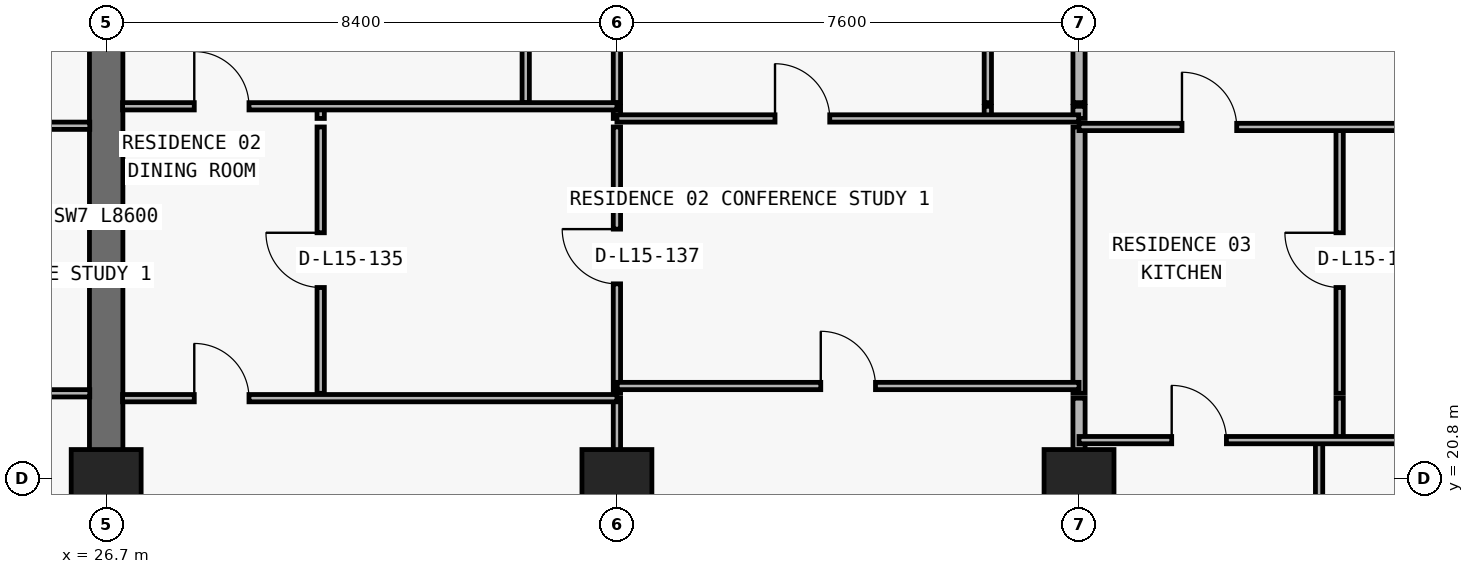
"""IFC4 building model, lengths in metres.
Left out: names, types, materials, properties, quantities, classifications, styles, units other than length and angle.
Written with IfcOpenShell. Run it as: python <this file> out.ifc"""

import sys

from ifc_helpers import new_model, si_unit, direction, frame, frame_2d, origin, origin_2d, place, context, subcontext, project, spatial, rectangle, extrude, element, fill, save


model = new_model("IFC4")
c1 = context("Model", 3, precision=1e-05, world=origin(), true_north=direction((0.0, 1.0)))
c2 = subcontext(c1, "Body", "Model", "MODEL_VIEW")
j1 = project(units=[si_unit("LENGTHUNIT", "METRE"), si_unit("PLANEANGLEUNIT", "RADIAN")], contexts=[c1])
p1 = place(None, origin())
s1 = spatial("IfcSite", under=j1, at=p1, CompositionType="ELEMENT")
p2 = place(p1, origin())
s2 = spatial("IfcBuilding", under=s1, at=p2, CompositionType="ELEMENT")
p3 = place(p2, frame((0.0, 0.0, 59.7)))
s3 = spatial("IfcBuildingStorey", under=s2, at=p3, CompositionType="ELEMENT", Elevation=59.7)
for number, where, z_axis, x_axis in (
    (1, (26.7, 20.8, 0.0), (0.0, 0.0, 1.0), (1.0, 0.0, 0.0)),
    (2, (35.1, 20.8, 0.0), (0.0, 0.0, 1.0), (1.0, 0.0, 0.0)),
    (3, (42.7, 20.8, 0.0), (0.0, 0.0, 1.0), (1.0, 0.0, 0.0)),
):
    element("IfcColumn", number, at=place(p3, frame(where, z_axis=z_axis, x_axis=x_axis)), inside=s3, PredefinedType="COLUMN", context=c2, shape_type="SweptSolid", body=[
        extrude(rectangle(XDim=1.15, YDim=0.95, at=origin_2d()), origin(), (0.0, 0.0, 1.0), 3.05),
    ])
p4 = place(p3, frame((26.7, 20.8, 0.0), z_axis=(0.0, 0.0, 1.0), x_axis=(0.0, 1.0, 0.0)))
e4 = element("IfcWall", 4, at=p4, inside=s3, PredefinedType="SHEAR", context=c2, shape_type="SweptSolid", body=[
    extrude(rectangle(XDim=8.6, YDim=0.55, at=frame_2d((4.3, 0.0))), origin(), (0.0, 0.0, 1.0), 3.05),
])
p5 = place(p3, frame((26.7, 6.24, 0.0), z_axis=(0.0, 0.0, 1.0), x_axis=(0.0, 1.0, 0.0)))
e5 = element("IfcWall", 5, at=p5, inside=s3, PredefinedType="PARTITIONING", context=c2, shape_type="SweptSolid", body=[
    extrude(rectangle(XDim=14.555, YDim=0.2, at=frame_2d((7.277, 0.0))), origin(), (0.0, 0.0, 1.0), 2.11),
])
p6 = place(p3, frame((30.228, 22.2, 0.0), z_axis=(0.0, 0.0, 1.0), x_axis=(0.0, 1.0, 0.0)))
e6 = element("IfcWall", 6, at=p6, inside=s3, PredefinedType="PARTITIONING", context=c2, shape_type="SweptSolid", body=[
    extrude(rectangle(XDim=4.38, YDim=0.12, at=frame_2d((2.19, 0.0))), origin(), (0.0, 0.0, 1.0), 3.05),
])
p7 = place(p6, frame((1.74, 0.0, 0.0)))
e7 = element("IfcOpeningElement", 7, at=p7, cuts=e6, PredefinedType="OPENING", context=c2, shape_type="SweptSolid", body=[
    extrude(rectangle(XDim=0.9, YDim=2.15, at=frame_2d((0.45, 1.075))), frame((0.0, 0.07, 0.0), z_axis=(0.0, -1.0, 0.0), x_axis=(1.0, 0.0, 0.0)), (0.0, 0.0, 1.0), 0.14),
])
p8 = place(p3, frame((30.228, 26.72, 0.0), z_axis=(0.0, 0.0, 1.0), x_axis=(0.0, 1.0, 0.0)))
e8 = element("IfcWall", 8, at=p8, inside=s3, PredefinedType="PARTITIONING", context=c2, shape_type="SweptSolid", body=[
    extrude(rectangle(XDim=0.2, YDim=0.12, at=frame_2d((0.1, 0.0))), origin(), (0.0, 0.0, 1.0), 3.05),
])
p9 = place(p3, frame((33.6, 26.98, 0.0), z_axis=(0.0, 0.0, 1.0), x_axis=(0.0, 1.0, 0.0)))
e9 = element("IfcWall", 9, at=p9, inside=s3, PredefinedType="PARTITIONING", context=c2, shape_type="SweptSolid", body=[
    extrude(rectangle(XDim=6.82, YDim=0.12, at=frame_2d((3.41, 0.0))), origin(), (0.0, 0.0, 1.0), 3.05),
])
p10 = place(p9, frame((3.435, 0.0, 0.0)))
e10 = element("IfcOpeningElement", 10, at=p10, cuts=e9, PredefinedType="OPENING", context=c2, shape_type="SweptSolid", body=[
    extrude(rectangle(XDim=0.85, YDim=2.1, at=frame_2d((0.425, 1.05))), frame((0.0, 0.07, 0.0), z_axis=(0.0, -1.0, 0.0), x_axis=(1.0, 0.0, 0.0)), (0.0, 0.0, 1.0), 0.14),
])
p11 = place(p3, frame((35.1, 6.24, 0.0), z_axis=(0.0, 0.0, 1.0), x_axis=(0.0, 1.0, 0.0)))
e11 = element("IfcWall", 11, at=p11, inside=s3, PredefinedType="PARTITIONING", context=c2, shape_type="SweptSolid", body=[
    extrude(rectangle(XDim=15.88, YDim=0.12, at=frame_2d((7.94, 0.0))), origin(), (0.0, 0.0, 1.0), 2.11),
])
p12 = place(p3, frame((35.1, 22.2, 0.0), z_axis=(0.0, 0.0, 1.0), x_axis=(0.0, 1.0, 0.0)))
e12 = element("IfcWall", 12, at=p12, inside=s3, PredefinedType="PARTITIONING", context=c2, shape_type="SweptSolid", body=[
    extrude(rectangle(XDim=4.38, YDim=0.12, at=frame_2d((2.19, 0.0))), origin(), (0.0, 0.0, 1.0), 2.11),
])
p13 = place(p12, frame((1.8, 0.0, 0.0)))
e13 = element("IfcOpeningElement", 13, at=p13, cuts=e12, PredefinedType="OPENING", context=c2, shape_type="SweptSolid", body=[
    extrude(rectangle(XDim=0.9, YDim=2.06, at=frame_2d((0.45, 1.03))), frame((0.0, 0.07, 0.0), z_axis=(0.0, -1.0, 0.0), x_axis=(1.0, 0.0, 0.0)), (0.0, 0.0, 1.0), 0.14),
])
p14 = place(p3, frame((35.1, 26.72, 0.0), z_axis=(0.0, 0.0, 1.0), x_axis=(0.0, 1.0, 0.0)))
e14 = element("IfcWall", 14, at=p14, inside=s3, PredefinedType="PARTITIONING", context=c2, shape_type="SweptSolid", body=[
    extrude(rectangle(XDim=0.2, YDim=0.12, at=frame_2d((0.1, 0.0))), origin(), (0.0, 0.0, 1.0), 2.11),
])
p15 = place(p3, frame((35.1, 26.98, 0.0), z_axis=(0.0, 0.0, 1.0), x_axis=(0.0, 1.0, 0.0)))
e15 = element("IfcWall", 15, at=p15, inside=s3, PredefinedType="PARTITIONING", context=c2, shape_type="SweptSolid", body=[
    extrude(rectangle(XDim=6.82, YDim=0.12, at=frame_2d((3.41, 0.0))), origin(), (0.0, 0.0, 1.0), 2.11),
])
p16 = place(p3, frame((41.2, 26.72, 0.0), z_axis=(0.0, 0.0, 1.0), x_axis=(0.0, 1.0, 0.0)))
e16 = element("IfcWall", 16, at=p16, inside=s3, PredefinedType="PARTITIONING", context=c2, shape_type="SweptSolid", body=[
    extrude(rectangle(XDim=0.2, YDim=0.12, at=frame_2d((0.1, 0.0))), origin(), (0.0, 0.0, 1.0), 3.05),
])
p17 = place(p3, frame((41.2, 26.98, 0.0), z_axis=(0.0, 0.0, 1.0), x_axis=(0.0, 1.0, 0.0)))
e17 = element("IfcWall", 17, at=p17, inside=s3, PredefinedType="PARTITIONING", context=c2, shape_type="SweptSolid", body=[
    extrude(rectangle(XDim=6.82, YDim=0.12, at=frame_2d((3.41, 0.0))), origin(), (0.0, 0.0, 1.0), 3.05),
])
p18 = place(p17, frame((3.435, 0.0, 0.0)))
e18 = element("IfcOpeningElement", 18, at=p18, cuts=e17, PredefinedType="OPENING", context=c2, shape_type="SweptSolid", body=[
    extrude(rectangle(XDim=0.85, YDim=2.1, at=frame_2d((0.425, 1.05))), frame((0.0, 0.07, 0.0), z_axis=(0.0, -1.0, 0.0), x_axis=(1.0, 0.0, 0.0)), (0.0, 0.0, 1.0), 0.14),
])
p19 = place(p3, frame((42.7, 6.24, 0.0), z_axis=(0.0, 0.0, 1.0), x_axis=(0.0, 1.0, 0.0)))
e19 = element("IfcWall", 19, at=p19, inside=s3, PredefinedType="PARTITIONING", context=c2, shape_type="SweptSolid", body=[
    extrude(rectangle(XDim=15.88, YDim=0.2, at=frame_2d((7.94, 0.0))), origin(), (0.0, 0.0, 1.0), 2.11),
])
p20 = place(p3, frame((42.7, 22.2, 0.0), z_axis=(0.0, 0.0, 1.0), x_axis=(0.0, 1.0, 0.0)))
e20 = element("IfcWall", 20, at=p20, inside=s3, PredefinedType="PARTITIONING", context=c2, shape_type="SweptSolid", body=[
    extrude(rectangle(XDim=4.38, YDim=0.2, at=frame_2d((2.19, 0.0))), origin(), (0.0, 0.0, 1.0), 2.11),
])
p21 = place(p3, frame((42.7, 26.72, 0.0), z_axis=(0.0, 0.0, 1.0), x_axis=(0.0, 1.0, 0.0)))
e21 = element("IfcWall", 21, at=p21, inside=s3, PredefinedType="PARTITIONING", context=c2, shape_type="SweptSolid", body=[
    extrude(rectangle(XDim=0.2, YDim=0.2, at=frame_2d((0.1, 0.0))), origin(), (0.0, 0.0, 1.0), 2.11),
])
p22 = place(p3, frame((42.7, 26.98, 0.0), z_axis=(0.0, 0.0, 1.0), x_axis=(0.0, 1.0, 0.0)))
e22 = element("IfcWall", 22, at=p22, inside=s3, PredefinedType="PARTITIONING", context=c2, shape_type="SweptSolid", body=[
    extrude(rectangle(XDim=6.82, YDim=0.2, at=frame_2d((3.41, 0.0))), origin(), (0.0, 0.0, 1.0), 2.11),
])
p23 = place(p3, frame((46.648, 6.24, 0.0), z_axis=(0.0, 0.0, 1.0), x_axis=(0.0, 1.0, 0.0)))
e23 = element("IfcWall", 23, at=p23, inside=s3, PredefinedType="PARTITIONING", context=c2, shape_type="SweptSolid", body=[
    extrude(rectangle(XDim=15.19, YDim=0.12, at=frame_2d((7.595, 0.0))), origin(), (0.0, 0.0, 1.0), 3.05),
])
p24 = place(p3, frame((46.986, 21.43, 0.0), z_axis=(0.0, 0.0, 1.0), x_axis=(0.0, 1.0, 0.0)))
e24 = element("IfcWall", 24, at=p24, inside=s3, PredefinedType="PARTITIONING", context=c2, shape_type="SweptSolid", body=[
    extrude(rectangle(XDim=0.69, YDim=0.12, at=frame_2d((0.345, 0.0))), origin(), (0.0, 0.0, 1.0), 3.05),
])
p25 = place(p3, frame((46.986, 22.2, 0.0), z_axis=(0.0, 0.0, 1.0), x_axis=(0.0, 1.0, 0.0)))
e25 = element("IfcWall", 25, at=p25, inside=s3, PredefinedType="PARTITIONING", context=c2, shape_type="SweptSolid", body=[
    extrude(rectangle(XDim=4.38, YDim=0.12, at=frame_2d((2.19, 0.0))), origin(), (0.0, 0.0, 1.0), 3.05),
])
p26 = place(p25, frame((1.74, 0.0, 0.0)))
e26 = element("IfcOpeningElement", 26, at=p26, cuts=e25, PredefinedType="OPENING", context=c2, shape_type="SweptSolid", body=[
    extrude(rectangle(XDim=0.9, YDim=2.15, at=frame_2d((0.45, 1.075))), frame((0.0, 0.07, 0.0), z_axis=(0.0, -1.0, 0.0), x_axis=(1.0, 0.0, 0.0)), (0.0, 0.0, 1.0), 0.14),
])
p27 = place(p3, frame((42.7, 21.43, 0.0), z_axis=(0.0, 0.0, 1.0), x_axis=(1.0, 0.0, 0.0)))
e27 = element("IfcWall", 27, at=p27, inside=s3, PredefinedType="PARTITIONING", context=c2, shape_type="SweptSolid", body=[
    extrude(rectangle(XDim=8.13, YDim=0.12, at=frame_2d((4.065, 0.0))), origin(), (0.0, 0.0, 1.0), 3.05),
])
p28 = place(p27, frame((1.524, 0.0, 0.0)))
e28 = element("IfcOpeningElement", 28, at=p28, cuts=e27, PredefinedType="OPENING", context=c2, shape_type="SweptSolid", body=[
    extrude(rectangle(XDim=0.9, YDim=2.15, at=frame_2d((0.45, 1.075))), frame((0.0, 0.07, 0.0), z_axis=(0.0, -1.0, 0.0), x_axis=(1.0, 0.0, 0.0)), (0.0, 0.0, 1.0), 0.14),
])
p29 = place(p27, frame((5.758, 0.0, 0.0)))
e29 = element("IfcOpeningElement", 29, at=p29, cuts=e27, PredefinedType="OPENING", context=c2, shape_type="SweptSolid", body=[
    extrude(rectangle(XDim=0.9, YDim=2.15, at=frame_2d((0.45, 1.075))), frame((0.0, 0.07, 0.0), z_axis=(0.0, -1.0, 0.0), x_axis=(1.0, 0.0, 0.0)), (0.0, 0.0, 1.0), 0.14),
])
p30 = place(p3, frame((26.97, 22.12, 0.0), z_axis=(0.0, 0.0, 1.0), x_axis=(1.0, 0.0, 0.0)))
e30 = element("IfcWall", 30, at=p30, inside=s3, PredefinedType="PARTITIONING", context=c2, shape_type="SweptSolid", body=[
    extrude(rectangle(XDim=8.13, YDim=0.12, at=frame_2d((4.065, 0.0))), origin(), (0.0, 0.0, 1.0), 3.05),
])
p31 = place(p30, frame((1.179, 0.0, 0.0)))
e31 = element("IfcOpeningElement", 31, at=p31, cuts=e30, PredefinedType="OPENING", context=c2, shape_type="SweptSolid", body=[
    extrude(rectangle(XDim=0.9, YDim=2.15, at=frame_2d((0.45, 1.075))), frame((0.0, 0.07, 0.0), z_axis=(0.0, -1.0, 0.0), x_axis=(1.0, 0.0, 0.0)), (0.0, 0.0, 1.0), 0.14),
])
p32 = place(p3, frame((18.305, 22.2, 0.0), z_axis=(0.0, 0.0, 1.0), x_axis=(1.0, 0.0, 0.0)))
e32 = element("IfcWall", 32, at=p32, inside=s3, PredefinedType="PARTITIONING", context=c2, shape_type="SweptSolid", body=[
    extrude(rectangle(XDim=8.125, YDim=0.12, at=frame_2d((4.062, 0.0))), origin(), (0.0, 0.0, 1.0), 3.05),
])
p33 = place(p32, frame((3.613, 0.0, 0.0)))
e33 = element("IfcOpeningElement", 33, at=p33, cuts=e32, PredefinedType="OPENING", context=c2, shape_type="SweptSolid", body=[
    extrude(rectangle(XDim=0.9, YDim=2.15, at=frame_2d((0.45, 1.075))), frame((0.0, 0.07, 0.0), z_axis=(0.0, -1.0, 0.0), x_axis=(1.0, 0.0, 0.0)), (0.0, 0.0, 1.0), 0.14),
])
p34 = place(p3, frame((35.105, 22.32, 0.0), z_axis=(0.0, 0.0, 1.0), x_axis=(1.0, 0.0, 0.0)))
e34 = element("IfcWall", 34, at=p34, inside=s3, PredefinedType="PARTITIONING", context=c2, shape_type="SweptSolid", body=[
    extrude(rectangle(XDim=7.595, YDim=0.12, at=frame_2d((3.797, 0.0))), origin(), (0.0, 0.0, 1.0), 3.05),
])
p35 = place(p34, frame((3.347, 0.0, 0.0)))
e35 = element("IfcOpeningElement", 35, at=p35, cuts=e34, PredefinedType="OPENING", context=c2, shape_type="SweptSolid", body=[
    extrude(rectangle(XDim=0.9, YDim=2.15, at=frame_2d((0.45, 1.075))), frame((0.0, 0.07, 0.0), z_axis=(0.0, -1.0, 0.0), x_axis=(1.0, 0.0, 0.0)), (0.0, 0.0, 1.0), 0.14),
])
p36 = place(p3, frame((42.7, 26.58, 0.0), z_axis=(0.0, 0.0, 1.0), x_axis=(1.0, 0.0, 0.0)))
e36 = element("IfcWall", 36, at=p36, inside=s3, PredefinedType="PARTITIONING", context=c2, shape_type="SweptSolid", body=[
    extrude(rectangle(XDim=8.13, YDim=0.12, at=frame_2d((4.065, 0.0))), origin(), (0.0, 0.0, 1.0), 3.05),
])
p37 = place(p36, frame((1.693, 0.0, 0.0)))
e37 = element("IfcOpeningElement", 37, at=p37, cuts=e36, PredefinedType="OPENING", context=c2, shape_type="SweptSolid", body=[
    extrude(rectangle(XDim=0.9, YDim=2.15, at=frame_2d((0.45, 1.075))), frame((0.0, 0.07, 0.0), z_axis=(0.0, -1.0, 0.0), x_axis=(1.0, 0.0, 0.0)), (0.0, 0.0, 1.0), 0.14),
])
p38 = place(p3, frame((18.3, 26.6, 0.0), z_axis=(0.0, 0.0, 1.0), x_axis=(1.0, 0.0, 0.0)))
e38 = element("IfcWall", 38, at=p38, inside=s3, PredefinedType="PARTITIONING", context=c2, shape_type="SweptSolid", body=[
    extrude(rectangle(XDim=8.13, YDim=0.12, at=frame_2d((4.065, 0.0))), origin(), (0.0, 0.0, 1.0), 3.05),
])
p39 = place(p38, frame((3.0, 0.0, 0.0)))
e39 = element("IfcOpeningElement", 39, at=p39, cuts=e38, PredefinedType="OPENING", context=c2, shape_type="SweptSolid", body=[
    extrude(rectangle(XDim=0.9, YDim=2.15, at=frame_2d((0.45, 1.075))), frame((0.0, 0.07, 0.0), z_axis=(0.0, -1.0, 0.0), x_axis=(1.0, 0.0, 0.0)), (0.0, 0.0, 1.0), 0.14),
])
p40 = place(p3, frame((35.1, 26.72, 0.0), z_axis=(0.0, 0.0, 1.0), x_axis=(1.0, 0.0, 0.0)))
e40 = element("IfcWall", 40, at=p40, inside=s3, PredefinedType="PARTITIONING", context=c2, shape_type="SweptSolid", body=[
    extrude(rectangle(XDim=7.595, YDim=0.12, at=frame_2d((3.797, 0.0))), origin(), (0.0, 0.0, 1.0), 3.05),
])
p41 = place(p40, frame((2.6, 0.0, 0.0)))
e41 = element("IfcOpeningElement", 41, at=p41, cuts=e40, PredefinedType="OPENING", context=c2, shape_type="SweptSolid", body=[
    extrude(rectangle(XDim=0.9, YDim=2.15, at=frame_2d((0.45, 1.075))), frame((0.0, 0.07, 0.0), z_axis=(0.0, -1.0, 0.0), x_axis=(1.0, 0.0, 0.0)), (0.0, 0.0, 1.0), 0.14),
])
p42 = place(p3, frame((26.97, 26.92, 0.0), z_axis=(0.0, 0.0, 1.0), x_axis=(1.0, 0.0, 0.0)))
e42 = element("IfcWall", 42, at=p42, inside=s3, PredefinedType="PARTITIONING", context=c2, shape_type="SweptSolid", body=[
    extrude(rectangle(XDim=8.13, YDim=0.12, at=frame_2d((4.065, 0.0))), origin(), (0.0, 0.0, 1.0), 3.05),
])
p43 = place(p42, frame((1.179, 0.0, 0.0)))
e43 = element("IfcOpeningElement", 43, at=p43, cuts=e42, PredefinedType="OPENING", context=c2, shape_type="SweptSolid", body=[
    extrude(rectangle(XDim=0.9, YDim=2.15, at=frame_2d((0.45, 1.075))), frame((0.0, 0.07, 0.0), z_axis=(0.0, -1.0, 0.0), x_axis=(1.0, 0.0, 0.0)), (0.0, 0.0, 1.0), 0.14),
])
p44 = place(p43, origin())
e44 = element("IfcDoor", 44, at=p44, inside=s3, OperationType="SINGLE_SWING_LEFT", PredefinedType="DOOR", context=c2, shape_type="SweptSolid", body=[
    extrude(rectangle(XDim=0.9, YDim=2.15, at=frame_2d((0.45, 1.075))), frame((0.0, 0.025, 0.0), z_axis=(0.0, -1.0, 0.0), x_axis=(1.0, 0.0, 0.0)), (0.0, 0.0, 1.0), 0.05),
])
fill(e43, e44)
p45 = place(p7, origin())
e45 = element("IfcDoor", 45, at=p45, inside=s3, OperationType="SINGLE_SWING_RIGHT", PredefinedType="DOOR", context=c2, shape_type="SweptSolid", body=[
    extrude(rectangle(XDim=0.9, YDim=2.15, at=frame_2d((0.45, 1.075))), frame((0.0, 0.025, 0.0), z_axis=(0.0, -1.0, 0.0), x_axis=(1.0, 0.0, 0.0)), (0.0, 0.0, 1.0), 0.05),
])
fill(e7, e45)
p46 = place(p31, origin())
e46 = element("IfcDoor", 46, at=p46, inside=s3, OperationType="SINGLE_SWING_LEFT", PredefinedType="DOOR", context=c2, shape_type="SweptSolid", body=[
    extrude(rectangle(XDim=0.9, YDim=2.15, at=frame_2d((0.45, 1.075))), frame((0.0, 0.025, 0.0), z_axis=(0.0, -1.0, 0.0), x_axis=(1.0, 0.0, 0.0)), (0.0, 0.0, 1.0), 0.05),
])
fill(e31, e46)
p47 = place(p13, origin())
e47 = element("IfcDoor", 47, at=p47, inside=s3, OperationType="SINGLE_SWING_RIGHT", PredefinedType="DOOR", context=c2, shape_type="SweptSolid", body=[
    extrude(rectangle(XDim=0.9, YDim=2.06, at=frame_2d((0.45, 1.03))), frame((0.0, 0.025, 0.0), z_axis=(0.0, -1.0, 0.0), x_axis=(1.0, 0.0, 0.0)), (0.0, 0.0, 1.0), 0.05),
])
fill(e13, e47)
p48 = place(p41, origin())
e48 = element("IfcDoor", 48, at=p48, inside=s3, OperationType="SINGLE_SWING_LEFT", PredefinedType="DOOR", context=c2, shape_type="SweptSolid", body=[
    extrude(rectangle(XDim=0.9, YDim=2.15, at=frame_2d((0.45, 1.075))), frame((0.0, 0.025, 0.0), z_axis=(0.0, -1.0, 0.0), x_axis=(1.0, 0.0, 0.0)), (0.0, 0.0, 1.0), 0.05),
])
fill(e41, e48)
p49 = place(p35, origin())
e49 = element("IfcDoor", 49, at=p49, inside=s3, OperationType="SINGLE_SWING_LEFT", PredefinedType="DOOR", context=c2, shape_type="SweptSolid", body=[
    extrude(rectangle(XDim=0.9, YDim=2.15, at=frame_2d((0.45, 1.075))), frame((0.0, 0.025, 0.0), z_axis=(0.0, -1.0, 0.0), x_axis=(1.0, 0.0, 0.0)), (0.0, 0.0, 1.0), 0.05),
])
fill(e35, e49)
p50 = place(p37, origin())
e50 = element("IfcDoor", 50, at=p50, inside=s3, OperationType="SINGLE_SWING_LEFT", PredefinedType="DOOR", context=c2, shape_type="SweptSolid", body=[
    extrude(rectangle(XDim=0.9, YDim=2.15, at=frame_2d((0.45, 1.075))), frame((0.0, 0.025, 0.0), z_axis=(0.0, -1.0, 0.0), x_axis=(1.0, 0.0, 0.0)), (0.0, 0.0, 1.0), 0.05),
])
fill(e37, e50)
p51 = place(p26, origin())
e51 = element("IfcDoor", 51, at=p51, inside=s3, OperationType="SINGLE_SWING_RIGHT", PredefinedType="DOOR", context=c2, shape_type="SweptSolid", body=[
    extrude(rectangle(XDim=0.9, YDim=2.15, at=frame_2d((0.45, 1.075))), frame((0.0, 0.025, 0.0), z_axis=(0.0, -1.0, 0.0), x_axis=(1.0, 0.0, 0.0)), (0.0, 0.0, 1.0), 0.05),
])
fill(e26, e51)
p52 = place(p28, origin())
e52 = element("IfcDoor", 52, at=p52, inside=s3, OperationType="SINGLE_SWING_LEFT", PredefinedType="DOOR", context=c2, shape_type="SweptSolid", body=[
    extrude(rectangle(XDim=0.9, YDim=2.15, at=frame_2d((0.45, 1.075))), frame((0.0, 0.025, 0.0), z_axis=(0.0, -1.0, 0.0), x_axis=(1.0, 0.0, 0.0)), (0.0, 0.0, 1.0), 0.05),
])
fill(e28, e52)
save(model, sys.argv[1])
